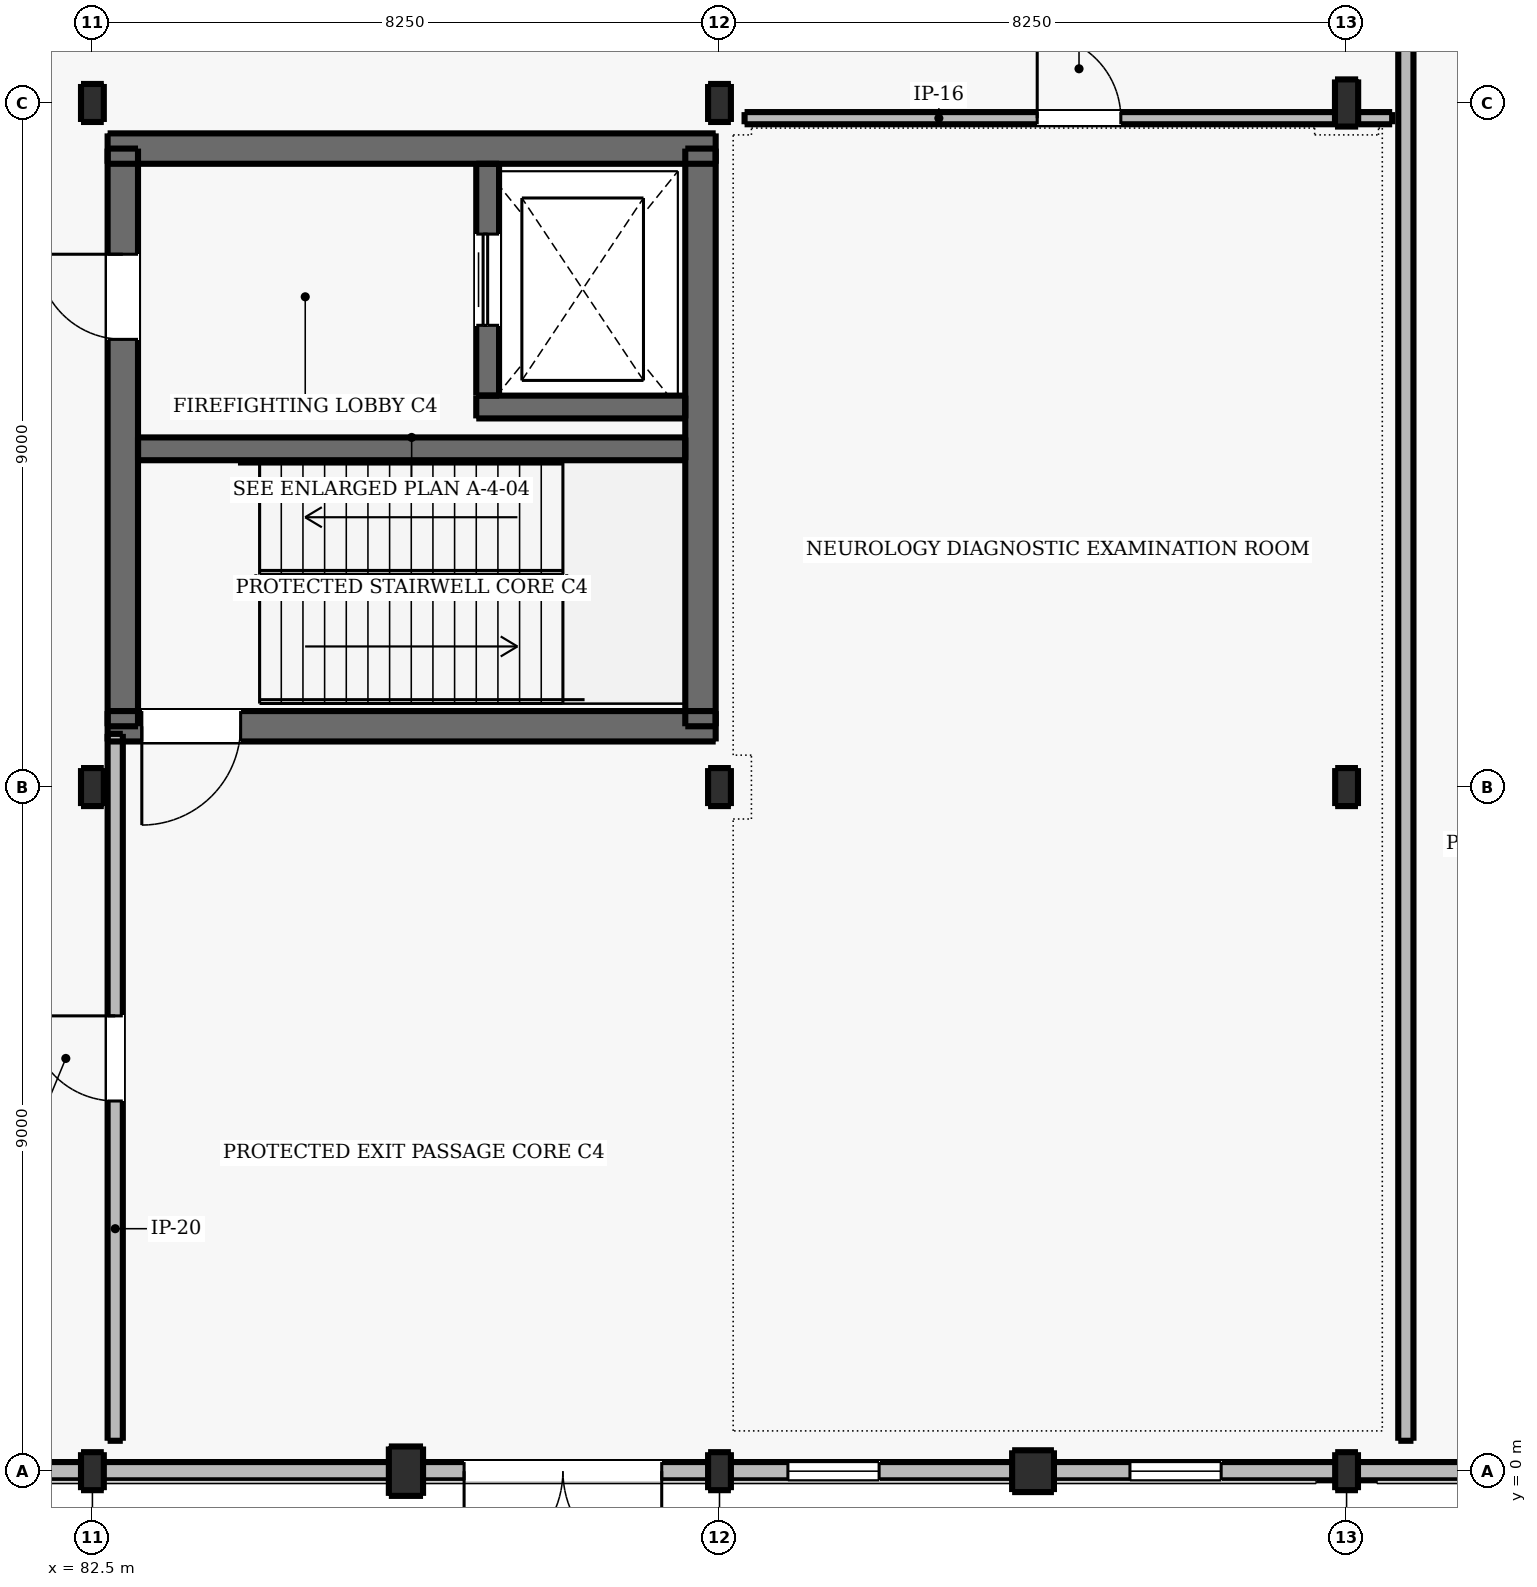
"""IFC4 building model, lengths in metres.
Left out: names, types, materials, properties, quantities, classifications, styles, units other than length and angle.
Written with IfcOpenShell. Run it as: python <this file> out.ifc"""

import sys

from ifc_helpers import new_model, si_unit, direction, frame, frame_2d, origin, origin_2d, place, context, subcontext, project, spatial, rectangle, i_section, extrude, element, fill, save


model = new_model("IFC4")
c1 = context("Model", 3, precision=1e-05, world=origin(), true_north=direction((0.0, 1.0)))
c2 = subcontext(c1, "Body", "Model", "MODEL_VIEW")
j1 = project(units=[si_unit("LENGTHUNIT", "METRE"), si_unit("PLANEANGLEUNIT", "RADIAN")], contexts=[c1])
p1 = place(None, origin())
s1 = spatial("IfcSite", under=j1, at=p1, CompositionType="ELEMENT")
p2 = place(p1, origin())
s2 = spatial("IfcBuilding", under=s1, at=p2, CompositionType="ELEMENT")
p3 = place(p2, origin())
s3 = spatial("IfcBuildingStorey", under=s2, at=p3, CompositionType="ELEMENT", Elevation=0.0)
for number, where, z_axis, x_axis in (
    (1, (82.5, 0.0, 0.0), (0.0, 0.0, 1.0), (1.0, 0.0, 0.0)),
    (2, (82.5, 9.0, 0.0), (0.0, 0.0, 1.0), (1.0, 0.0, 0.0)),
    (3, (82.5, 18.0, 0.0), (0.0, 0.0, 1.0), (1.0, 0.0, 0.0)),
):
    element("IfcColumn", number, at=place(p3, frame(where, z_axis=z_axis, x_axis=x_axis)), inside=s3, PredefinedType="COLUMN", context=c2, shape_type="SweptSolid", body=[
        extrude(i_section(OverallWidth=0.3, OverallDepth=0.5, WebThickness=0.014, FlangeThickness=0.028, FilletRadius=0.027, at=origin_2d()), origin(), (0.0, 0.0, 1.0), 5.1),
    ])
p4 = place(p3, frame((86.625, 0.0, 0.0), z_axis=(0.0, 0.0, 1.0), x_axis=(1.0, 0.0, 0.0)))
e4 = element("IfcColumn", 4, at=p4, inside=s3, PredefinedType="PILASTER", context=c2, shape_type="SweptSolid", body=[
    extrude(rectangle(XDim=0.45, YDim=0.65, at=origin_2d()), origin(), (0.0, 0.0, 1.0), 5.1),
])
for number, where, z_axis, x_axis in (
    (5, (90.75, 0.0, 0.0), (0.0, 0.0, 1.0), (1.0, 0.0, 0.0)),
    (6, (90.75, 9.0, 0.0), (0.0, 0.0, 1.0), (1.0, 0.0, 0.0)),
    (7, (90.75, 18.0, 0.0), (0.0, 0.0, 1.0), (1.0, 0.0, 0.0)),
):
    element("IfcColumn", number, at=place(p3, frame(where, z_axis=z_axis, x_axis=x_axis)), inside=s3, PredefinedType="COLUMN", context=c2, shape_type="SweptSolid", body=[
        extrude(i_section(OverallWidth=0.3, OverallDepth=0.5, WebThickness=0.014, FlangeThickness=0.028, FilletRadius=0.027, at=origin_2d()), origin(), (0.0, 0.0, 1.0), 5.1),
    ])
p5 = place(p3, frame((94.875, 0.0, 0.0), z_axis=(0.0, 0.0, 1.0), x_axis=(1.0, 0.0, 0.0)))
e8 = element("IfcColumn", 8, at=p5, inside=s3, PredefinedType="PILASTER", context=c2, shape_type="SweptSolid", body=[
    extrude(rectangle(XDim=0.55, YDim=0.55, at=origin_2d()), origin(), (0.0, 0.0, 1.0), 5.1),
])
for number, where, z_axis, x_axis in (
    (9, (99.0, 0.0, 0.0), (0.0, 0.0, 1.0), (1.0, 0.0, 0.0)),
    (10, (99.0, 9.0, 0.0), (0.0, 0.0, 1.0), (1.0, 0.0, 0.0)),
):
    element("IfcColumn", number, at=place(p3, frame(where, z_axis=z_axis, x_axis=x_axis)), inside=s3, PredefinedType="COLUMN", context=c2, shape_type="SweptSolid", body=[
        extrude(i_section(OverallWidth=0.3, OverallDepth=0.5, WebThickness=0.014, FlangeThickness=0.028, FilletRadius=0.027, at=origin_2d()), origin(), (0.0, 0.0, 1.0), 5.1),
    ])
p6 = place(p3, frame((99.0, 18.0, 0.0), z_axis=(0.0, 0.0, 1.0), x_axis=(1.0, 0.0, 0.0)))
e11 = element("IfcColumn", 11, at=p6, inside=s3, PredefinedType="COLUMN", context=c2, shape_type="SweptSolid", body=[
    extrude(i_section(OverallWidth=0.305, OverallDepth=0.62, WebThickness=0.021, FlangeThickness=0.04, FilletRadius=0.027, at=origin_2d()), origin(), (0.0, 0.0, 1.0), 5.1),
])
p7 = place(p3, frame((82.7, 9.8, 0.0), z_axis=(0.0, 0.0, 1.0), x_axis=(1.0, 0.0, 0.0)))
e12 = element("IfcWall", 12, at=p7, inside=s3, PredefinedType="SHEAR", context=c2, shape_type="SweptSolid", body=[
    extrude(rectangle(XDim=8.0, YDim=0.4, at=frame_2d((4.0, 0.0))), origin(), (0.0, 0.0, 1.0), 5.1),
])
p8 = place(p7, frame((0.45, 0.0, 0.0)))
e13 = element("IfcOpeningElement", 13, at=p8, cuts=e12, PredefinedType="OPENING", context=c2, shape_type="SweptSolid", body=[
    extrude(rectangle(XDim=1.3, YDim=2.15, at=frame_2d((0.65, 1.075))), frame((0.0, 0.21, 0.0), z_axis=(0.0, -1.0, 0.0), x_axis=(1.0, 0.0, 0.0)), (0.0, 0.0, 1.0), 0.42),
])
p9 = place(p3, frame((82.7, 17.4, 0.0), z_axis=(0.0, 0.0, 1.0), x_axis=(1.0, 0.0, 0.0)))
e14 = element("IfcWall", 14, at=p9, inside=s3, PredefinedType="SHEAR", context=c2, shape_type="SweptSolid", body=[
    extrude(rectangle(XDim=8.0, YDim=0.4, at=frame_2d((4.0, 0.0))), origin(), (0.0, 0.0, 1.0), 5.1),
])
p10 = place(p3, frame((82.9, 9.8, 0.0), z_axis=(0.0, 0.0, 1.0), x_axis=(0.0, 1.0, 0.0)))
e15 = element("IfcWall", 15, at=p10, inside=s3, PredefinedType="SHEAR", context=c2, shape_type="SweptSolid", body=[
    extrude(rectangle(XDim=7.6, YDim=0.4, at=frame_2d((3.8, 0.0))), origin(), (0.0, 0.0, 1.0), 5.1),
])
p11 = place(p10, frame((5.09, 0.0, 0.0)))
e16 = element("IfcOpeningElement", 16, at=p11, cuts=e15, PredefinedType="OPENING", context=c2, shape_type="SweptSolid", body=[
    extrude(rectangle(XDim=1.12, YDim=2.15, at=frame_2d((0.56, 1.075))), frame((0.0, 0.21, 0.0), z_axis=(0.0, -1.0, 0.0), x_axis=(1.0, 0.0, 0.0)), (0.0, 0.0, 1.0), 0.42),
])
p12 = place(p3, frame((90.5, 9.8, 0.0), z_axis=(0.0, 0.0, 1.0), x_axis=(0.0, 1.0, 0.0)))
e17 = element("IfcWall", 17, at=p12, inside=s3, PredefinedType="SHEAR", context=c2, shape_type="SweptSolid", body=[
    extrude(rectangle(XDim=7.6, YDim=0.4, at=frame_2d((3.8, 0.0))), origin(), (0.0, 0.0, 1.0), 5.1),
])
p13 = place(p3, frame((83.1, 13.45, 0.0), z_axis=(0.0, 0.0, 1.0), x_axis=(1.0, 0.0, 0.0)))
e18 = element("IfcWall", 18, at=p13, inside=s3, PredefinedType="SHEAR", context=c2, shape_type="SweptSolid", body=[
    extrude(rectangle(XDim=7.2, YDim=0.3, at=frame_2d((3.6, 0.0))), origin(), (0.0, 0.0, 1.0), 5.1),
])
p14 = place(p3, frame((87.55, 14.0, 0.0), z_axis=(0.0, 0.0, 1.0), x_axis=(1.0, 0.0, 0.0)))
e19 = element("IfcWall", 19, at=p14, inside=s3, PredefinedType="SHEAR", context=c2, shape_type="SweptSolid", body=[
    extrude(rectangle(XDim=2.75, YDim=0.3, at=frame_2d((1.375, 0.0))), origin(), (0.0, 0.0, 1.0), 5.1),
])
p15 = place(p3, frame((87.7, 14.15, 0.0), z_axis=(0.0, 0.0, 1.0), x_axis=(0.0, 1.0, 0.0)))
e20 = element("IfcWall", 20, at=p15, inside=s3, PredefinedType="SHEAR", context=c2, shape_type="SweptSolid", body=[
    extrude(rectangle(XDim=3.05, YDim=0.3, at=frame_2d((1.525, 0.0))), origin(), (0.0, 0.0, 1.0), 5.1),
])
p16 = place(p15, frame((0.925, 0.0, 0.0)))
e21 = element("IfcOpeningElement", 21, at=p16, cuts=e20, PredefinedType="OPENING", context=c2, shape_type="SweptSolid", body=[
    extrude(rectangle(XDim=1.2, YDim=2.15, at=frame_2d((0.6, 1.075))), frame((0.0, 0.16, 0.0), z_axis=(0.0, -1.0, 0.0), x_axis=(1.0, 0.0, 0.0)), (0.0, 0.0, 1.0), 0.32),
])
p17 = place(p3, frame((99.0, 0.0, 0.0), z_axis=(0.0, 0.0, 1.0), x_axis=(-1.0, 0.0, 0.0)))
e22 = element("IfcWall", 22, at=p17, inside=s3, PredefinedType="SOLIDWALL", context=c2, shape_type="SweptSolid", body=[
    extrude(rectangle(XDim=45.0, YDim=0.24, at=frame_2d((22.5, 0.0))), origin(), (0.0, 0.0, 1.0), 4.31),
])
p18 = place(p17, frame((29.64, 0.0, 0.0)))
e23 = element("IfcOpeningElement", 23, at=p18, cuts=e22, PredefinedType="OPENING", context=c2, shape_type="SweptSolid", body=[
    extrude(rectangle(XDim=2.6, YDim=2.6, at=frame_2d((1.3, 1.3))), frame((0.0, 0.13, 0.0), z_axis=(0.0, -1.0, 0.0), x_axis=(1.0, 0.0, 0.0)), (0.0, 0.0, 1.0), 0.26),
])
p19 = place(p17, frame((17.26, 0.0, 0.0)))
e24 = element("IfcOpeningElement", 24, at=p19, cuts=e22, PredefinedType="OPENING", context=c2, shape_type="SweptSolid", body=[
    extrude(rectangle(XDim=2.6, YDim=2.6, at=frame_2d((1.3, 1.3))), frame((0.0, 0.13, 0.0), z_axis=(0.0, -1.0, 0.0), x_axis=(1.0, 0.0, 0.0)), (0.0, 0.0, 1.0), 0.26),
])
p20 = place(p17, frame((9.01, 0.0, 0.0)))
e25 = element("IfcOpeningElement", 25, at=p20, cuts=e22, PredefinedType="OPENING", context=c2, shape_type="SweptSolid", body=[
    extrude(rectangle(XDim=2.6, YDim=2.6, at=frame_2d((1.3, 1.3))), frame((0.0, 0.13, 0.0), z_axis=(0.0, -1.0, 0.0), x_axis=(1.0, 0.0, 0.0)), (0.0, 0.0, 1.0), 0.26),
])
p21 = place(p17, frame((1.65, 0.0, 1.05)))
e26 = element("IfcOpeningElement", 26, at=p21, cuts=e22, PredefinedType="OPENING", context=c2, shape_type="SweptSolid", body=[
    extrude(rectangle(XDim=1.2, YDim=1.5, at=frame_2d((0.6, 0.75))), frame((0.0, 0.13, 0.0), z_axis=(0.0, -1.0, 0.0), x_axis=(1.0, 0.0, 0.0)), (0.0, 0.0, 1.0), 0.26),
])
p22 = place(p17, frame((6.15, 0.0, 1.05)))
e27 = element("IfcOpeningElement", 27, at=p22, cuts=e22, PredefinedType="OPENING", context=c2, shape_type="SweptSolid", body=[
    extrude(rectangle(XDim=1.2, YDim=1.5, at=frame_2d((0.6, 0.75))), frame((0.0, 0.13, 0.0), z_axis=(0.0, -1.0, 0.0), x_axis=(1.0, 0.0, 0.0)), (0.0, 0.0, 1.0), 0.26),
])
p23 = place(p3, frame((111.0, 0.0, 0.0), z_axis=(0.0, 0.0, 1.0), x_axis=(-1.0, 0.0, 0.0)))
e28 = element("IfcWall", 28, at=p23, inside=s3, PredefinedType="SOLIDWALL", context=c2, shape_type="SweptSolid", body=[
    extrude(rectangle(XDim=12.0, YDim=0.24, at=frame_2d((6.0, 0.0))), origin(), (0.0, 0.0, 1.0), 4.31),
])
p24 = place(p23, frame((7.7, 0.0, 0.0)))
e29 = element("IfcOpeningElement", 29, at=p24, cuts=e28, PredefinedType="OPENING", context=c2, shape_type="SweptSolid", body=[
    extrude(rectangle(XDim=2.6, YDim=2.6, at=frame_2d((1.3, 1.3))), frame((0.0, 0.13, 0.0), z_axis=(0.0, -1.0, 0.0), x_axis=(1.0, 0.0, 0.0)), (0.0, 0.0, 1.0), 0.26),
])
p25 = place(p23, frame((2.3, 0.0, 1.05)))
e30 = element("IfcOpeningElement", 30, at=p25, cuts=e28, PredefinedType="OPENING", context=c2, shape_type="SweptSolid", body=[
    extrude(rectangle(XDim=1.4, YDim=1.9, at=frame_2d((0.7, 0.95))), frame((0.0, 0.13, 0.0), z_axis=(0.0, -1.0, 0.0), x_axis=(1.0, 0.0, 0.0)), (0.0, 0.0, 1.0), 0.26),
])
p26 = place(p3, frame((82.8, 0.4, 0.0), z_axis=(0.0, 0.0, 1.0), x_axis=(0.0, 1.0, 0.0)))
e31 = element("IfcWall", 31, at=p26, inside=s3, PredefinedType="PARTITIONING", context=c2, shape_type="SweptSolid", body=[
    extrude(rectangle(XDim=9.3, YDim=0.2, at=frame_2d((4.65, 0.0))), origin(), (0.0, 0.0, 1.0), 4.82),
])
p27 = place(p26, frame((4.47, 0.0, 0.0)))
e32 = element("IfcOpeningElement", 32, at=p27, cuts=e31, PredefinedType="OPENING", context=c2, shape_type="SweptSolid", body=[
    extrude(rectangle(XDim=1.12, YDim=2.15, at=frame_2d((0.56, 1.075))), frame((0.0, 0.11, 0.0), z_axis=(0.0, -1.0, 0.0), x_axis=(1.0, 0.0, 0.0)), (0.0, 0.0, 1.0), 0.22),
])
p28 = place(p3, frame((99.78, 0.4, 0.0), z_axis=(0.0, 0.0, 1.0), x_axis=(0.0, 1.0, 0.0)))
e33 = element("IfcWall", 33, at=p28, inside=s3, PredefinedType="PARTITIONING", context=c2, shape_type="SweptSolid", body=[
    extrude(rectangle(XDim=23.75, YDim=0.2, at=frame_2d((11.875, 0.0))), origin(), (0.0, 0.0, 1.0), 4.82),
])
p29 = place(p3, frame((91.08, 17.8, 0.0), z_axis=(0.0, 0.0, 1.0), x_axis=(1.0, 0.0, 0.0)))
e34 = element("IfcWall", 34, at=p29, inside=s3, PredefinedType="PARTITIONING", context=c2, shape_type="SweptSolid", body=[
    extrude(rectangle(XDim=8.52, YDim=0.16, at=frame_2d((4.26, 0.0))), origin(), (0.0, 0.0, 1.0), 4.26),
])
p30 = place(p29, frame((3.85, 0.0, 0.0)))
e35 = element("IfcOpeningElement", 35, at=p30, cuts=e34, PredefinedType="OPENING", context=c2, shape_type="SweptSolid", body=[
    extrude(rectangle(XDim=1.1, YDim=2.15, at=frame_2d((0.55, 1.075))), frame((0.0, 0.09, 0.0), z_axis=(0.0, -1.0, 0.0), x_axis=(1.0, 0.0, 0.0)), (0.0, 0.0, 1.0), 0.18),
])
p31 = place(p20, origin())
e36 = element("IfcDoor", 36, at=p31, inside=s3, OperationType="DOUBLE_DOOR_SINGLE_SWING", PredefinedType="DOOR", context=c2, shape_type="SweptSolid", body=[
    extrude(rectangle(XDim=2.6, YDim=2.6, at=frame_2d((1.3, 1.3))), frame((0.0, 0.025, 0.0), z_axis=(0.0, -1.0, 0.0), x_axis=(1.0, 0.0, 0.0)), (0.0, 0.0, 1.0), 0.05),
])
fill(e25, e36)
p32 = place(p21, origin())
e37 = element("IfcWindow", 37, at=p32, inside=s3, PartitioningType="SINGLE_PANEL", PredefinedType="WINDOW", context=c2, shape_type="SweptSolid", body=[
    extrude(rectangle(XDim=1.2, YDim=1.5, at=frame_2d((0.6, 0.75))), frame((0.0, 0.03, 0.0), z_axis=(0.0, -1.0, 0.0), x_axis=(1.0, 0.0, 0.0)), (0.0, 0.0, 1.0), 0.06),
])
fill(e26, e37)
p33 = place(p22, origin())
e38 = element("IfcWindow", 38, at=p33, inside=s3, PartitioningType="SINGLE_PANEL", PredefinedType="WINDOW", context=c2, shape_type="SweptSolid", body=[
    extrude(rectangle(XDim=1.2, YDim=1.5, at=frame_2d((0.6, 0.75))), frame((0.0, 0.03, 0.0), z_axis=(0.0, -1.0, 0.0), x_axis=(1.0, 0.0, 0.0)), (0.0, 0.0, 1.0), 0.06),
])
fill(e27, e38)
p34 = place(p16, origin())
e39 = element("IfcDoor", 39, at=p34, inside=s3, OperationType="DOUBLE_DOOR_SLIDING", PredefinedType="DOOR", context=c2, shape_type="SweptSolid", body=[
    extrude(rectangle(XDim=1.2, YDim=2.15, at=frame_2d((0.6, 1.075))), frame((0.0, 0.025, 0.0), z_axis=(0.0, -1.0, 0.0), x_axis=(1.0, 0.0, 0.0)), (0.0, 0.0, 1.0), 0.05),
])
fill(e21, e39)
p35 = place(p11, origin())
e40 = element("IfcDoor", 40, at=p35, inside=s3, OperationType="SINGLE_SWING_RIGHT", PredefinedType="DOOR", context=c2, shape_type="SweptSolid", body=[
    extrude(rectangle(XDim=1.12, YDim=2.15, at=frame_2d((0.56, 1.075))), frame((0.0, 0.025, 0.0), z_axis=(0.0, -1.0, 0.0), x_axis=(1.0, 0.0, 0.0)), (0.0, 0.0, 1.0), 0.05),
])
fill(e16, e40)
p36 = place(p8, frame((1.3, 0.0, 0.0), z_axis=(0.0, 0.0, 1.0), x_axis=(-1.0, 0.0, 0.0)))
e41 = element("IfcDoor", 41, at=p36, inside=s3, OperationType="SINGLE_SWING_LEFT", PredefinedType="DOOR", context=c2, shape_type="SweptSolid", body=[
    extrude(rectangle(XDim=1.3, YDim=2.15, at=frame_2d((0.65, 1.075))), frame((0.0, 0.025, 0.0), z_axis=(0.0, -1.0, 0.0), x_axis=(1.0, 0.0, 0.0)), (0.0, 0.0, 1.0), 0.05),
])
fill(e13, e41)
p37 = place(p27, origin())
e42 = element("IfcDoor", 42, at=p37, inside=s3, OperationType="SINGLE_SWING_RIGHT", PredefinedType="DOOR", context=c2, shape_type="SweptSolid", body=[
    extrude(rectangle(XDim=1.12, YDim=2.15, at=frame_2d((0.56, 1.075))), frame((0.0, 0.025, 0.0), z_axis=(0.0, -1.0, 0.0), x_axis=(1.0, 0.0, 0.0)), (0.0, 0.0, 1.0), 0.05),
])
fill(e32, e42)
p38 = place(p30, origin())
e43 = element("IfcDoor", 43, at=p38, inside=s3, OperationType="SINGLE_SWING_LEFT", PredefinedType="DOOR", context=c2, shape_type="SweptSolid", body=[
    extrude(rectangle(XDim=1.1, YDim=2.15, at=frame_2d((0.55, 1.075))), frame((0.0, 0.025, 0.0), z_axis=(0.0, -1.0, 0.0), x_axis=(1.0, 0.0, 0.0)), (0.0, 0.0, 1.0), 0.05),
])
fill(e35, e43)
save(model, sys.argv[1])
